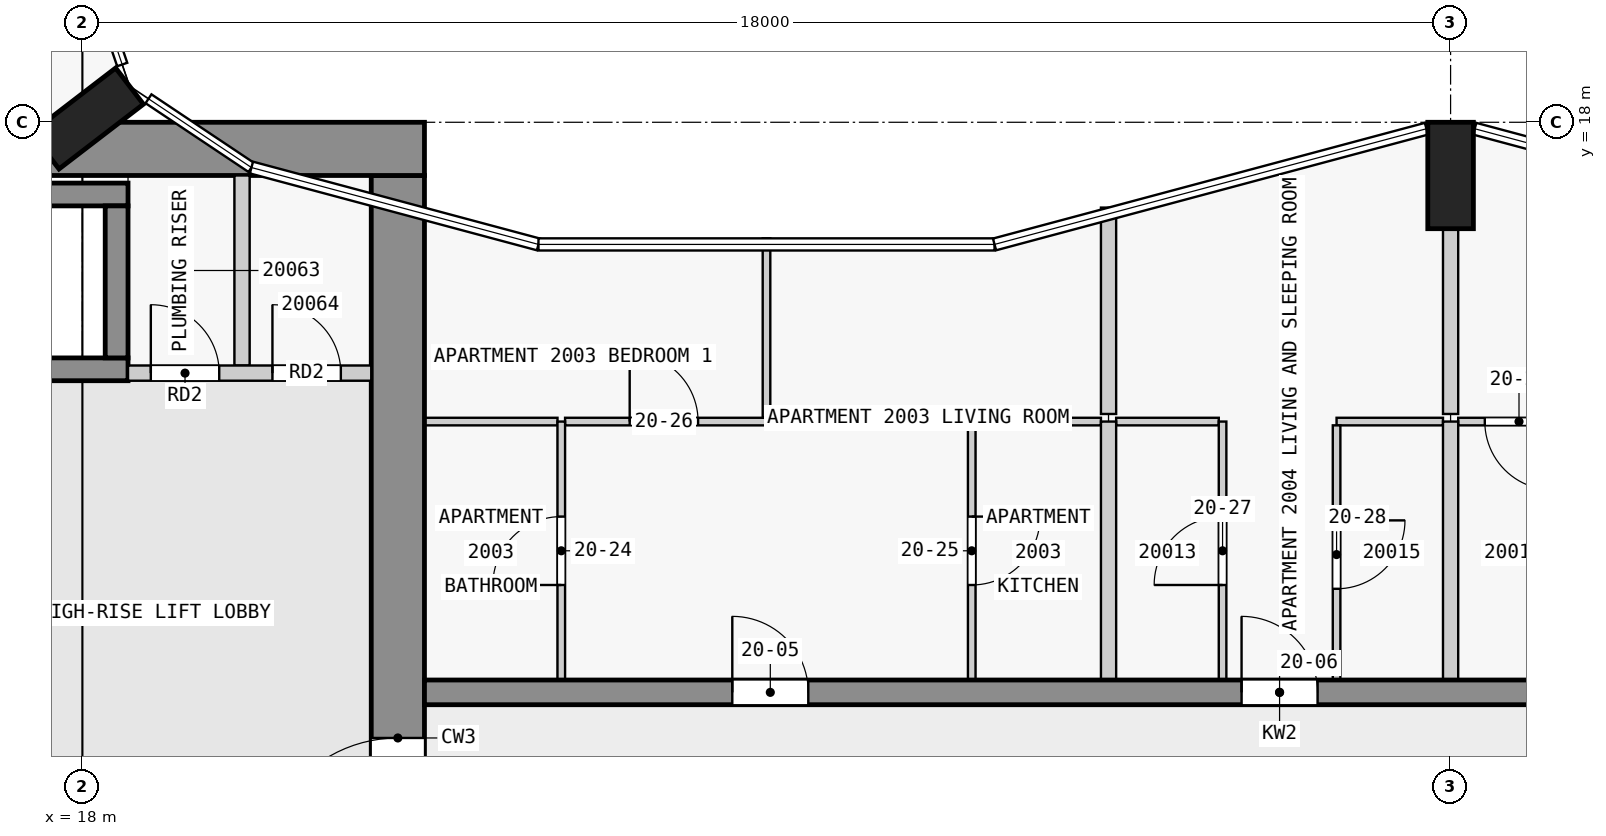
"""IFC4 building model, lengths in metres.
Left out: names, types, materials, properties, quantities, classifications, styles, units other than length and angle.
Written with IfcOpenShell. Run it as: python <this file> out.ifc"""

import sys

from ifc_helpers import new_model, si_unit, direction, frame, frame_2d, origin, origin_2d, place, context, subcontext, project, spatial, rectangle, extrude, element, fill, save


model = new_model("IFC4")
c1 = context("Model", 3, precision=1e-05, world=origin(), true_north=direction((0.0, 1.0)))
c2 = subcontext(c1, "Body", "Model", "MODEL_VIEW")
j1 = project(units=[si_unit("LENGTHUNIT", "METRE"), si_unit("PLANEANGLEUNIT", "RADIAN")], contexts=[c1])
p1 = place(None, origin())
s1 = spatial("IfcSite", under=j1, at=p1, CompositionType="ELEMENT")
p2 = place(p1, origin())
s2 = spatial("IfcBuilding", under=s1, at=p2, CompositionType="ELEMENT")
p3 = place(p2, frame((0.0, 0.0, 81.8)))
s3 = spatial("IfcBuildingStorey", under=s2, at=p3, CompositionType="ELEMENT", Elevation=81.8)
for number, where, z_axis, x_axis in (
    (1, (36.0, 17.3, 0.0), (0.0, 0.0, 1.0), (1.0, 0.0, 0.0)),
    (2, (18.065, 18.05, 0.0), (0.0, 0.0, 1.0), (-0.609, 0.793, 0.0)),
):
    element("IfcColumn", number, at=place(p3, frame(where, z_axis=z_axis, x_axis=x_axis)), inside=s3, PredefinedType="COLUMN", context=c2, shape_type="SweptSolid", body=[
        extrude(rectangle(XDim=0.6, YDim=1.4, at=origin_2d()), origin(), (0.0, 0.0, 1.0), 3.5),
    ])
p4 = place(p3, frame((1.6, 17.65, 0.0), z_axis=(0.0, 0.0, 1.0), x_axis=(1.0, 0.0, 0.0)))
e3 = element("IfcWall", 3, at=p4, inside=s3, PredefinedType="SHEAR", context=c2, shape_type="SweptSolid", body=[
    extrude(rectangle(XDim=20.9, YDim=0.7, at=frame_2d((10.45, 0.0))), origin(), (0.0, 0.0, 1.0), 3.25),
])
p5 = place(p4, frame((6.5, 0.0, 0.0)))
e4 = element("IfcOpeningElement", 4, at=p5, cuts=e3, PredefinedType="OPENING", context=c2, shape_type="SweptSolid", body=[
    extrude(rectangle(XDim=1.8, YDim=2.1, at=frame_2d((0.9, 1.05))), frame((0.0, 0.36, 0.0), z_axis=(0.0, -1.0, 0.0), x_axis=(1.0, 0.0, 0.0)), (0.0, 0.0, 1.0), 0.72),
])
p6 = place(p3, frame((22.15, 2.5, 0.0), z_axis=(0.0, 0.0, 1.0), x_axis=(0.0, 1.0, 0.0)))
e5 = element("IfcWall", 5, at=p6, inside=s3, PredefinedType="SHEAR", context=c2, shape_type="SweptSolid", body=[
    extrude(rectangle(XDim=14.8, YDim=0.7, at=frame_2d((7.4, 0.0))), origin(), (0.0, 0.0, 1.0), 3.25),
])
p7 = place(p6, frame((5.6, 0.0, 0.0)))
e6 = element("IfcOpeningElement", 6, at=p7, cuts=e5, PredefinedType="OPENING", context=c2, shape_type="SweptSolid", body=[
    extrude(rectangle(XDim=1.8, YDim=2.1, at=frame_2d((0.9, 1.05))), frame((0.0, 0.36, 0.0), z_axis=(0.0, -1.0, 0.0), x_axis=(1.0, 0.0, 0.0)), (0.0, 0.0, 1.0), 0.72),
])
for number, where, z_axis, x_axis in (
    (7, (10.8, 17.05, 0.0), (0.0, 0.0, 1.0), (1.0, 0.0, 0.0)),
    (8, (10.8, 14.75, 0.0), (0.0, 0.0, 1.0), (1.0, 0.0, 0.0)),
):
    element("IfcWall", number, at=place(p3, frame(where, z_axis=z_axis, x_axis=x_axis)), inside=s3, PredefinedType="SHEAR", context=c2, shape_type="SweptSolid", body=[
        extrude(rectangle(XDim=7.8, YDim=0.3, at=frame_2d((3.9, 0.0))), origin(), (0.0, 0.0, 1.0), 3.25),
    ])
p8 = place(p3, frame((18.45, 14.9, 0.0), z_axis=(0.0, 0.0, 1.0), x_axis=(0.0, 1.0, 0.0)))
e9 = element("IfcWall", 9, at=p8, inside=s3, PredefinedType="SHEAR", context=c2, shape_type="SweptSolid", body=[
    extrude(rectangle(XDim=2.0, YDim=0.3, at=frame_2d((1.0, 0.0))), origin(), (0.0, 0.0, 1.0), 3.25),
])
p9 = place(p3, frame((22.5, 10.5, 0.0), z_axis=(0.0, 0.0, 1.0), x_axis=(1.0, 0.0, 0.0)))
e10 = element("IfcWall", 10, at=p9, inside=s3, PredefinedType="SHEAR", context=c2, shape_type="SweptSolid", body=[
    extrude(rectangle(XDim=22.5, YDim=0.325, at=frame_2d((11.25, 0.0))), origin(), (0.0, 0.0, 1.0), 3.25),
])
p10 = place(p9, frame((4.05, 0.0, 0.0)))
e11 = element("IfcOpeningElement", 11, at=p10, cuts=e10, PredefinedType="OPENING", context=c2, shape_type="SweptSolid", body=[
    extrude(rectangle(XDim=1.0, YDim=2.1, at=frame_2d((0.5, 1.05))), frame((0.0, 0.172, 0.0), z_axis=(0.0, -1.0, 0.0), x_axis=(1.0, 0.0, 0.0)), (0.0, 0.0, 1.0), 0.345),
])
p11 = place(p9, frame((10.75, 0.0, 0.0)))
e12 = element("IfcOpeningElement", 12, at=p11, cuts=e10, PredefinedType="OPENING", context=c2, shape_type="SweptSolid", body=[
    extrude(rectangle(XDim=1.0, YDim=2.1, at=frame_2d((0.5, 1.05))), frame((0.0, 0.172, 0.0), z_axis=(0.0, -1.0, 0.0), x_axis=(1.0, 0.0, 0.0)), (0.0, 0.0, 1.0), 0.345),
])
p12 = place(p9, frame((16.85, 0.0, 0.0)))
e13 = element("IfcOpeningElement", 13, at=p12, cuts=e10, PredefinedType="OPENING", context=c2, shape_type="SweptSolid", body=[
    extrude(rectangle(XDim=1.0, YDim=2.1, at=frame_2d((0.5, 1.05))), frame((0.0, 0.172, 0.0), z_axis=(0.0, -1.0, 0.0), x_axis=(1.0, 0.0, 0.0)), (0.0, 0.0, 1.0), 0.345),
])
p13 = place(p3, frame((18.6, 14.7, 0.0), z_axis=(0.0, 0.0, 1.0), x_axis=(1.0, 0.0, 0.0)))
e14 = element("IfcWall", 14, at=p13, inside=s3, PredefinedType="PARTITIONING", context=c2, shape_type="SweptSolid", body=[
    extrude(rectangle(XDim=3.2, YDim=0.2, at=frame_2d((1.6, 0.0))), origin(), (0.0, 0.0, 1.0), 3.25),
])
p14 = place(p13, frame((0.3, 0.0, 0.0)))
e15 = element("IfcOpeningElement", 15, at=p14, cuts=e14, PredefinedType="OPENING", context=c2, shape_type="SweptSolid", body=[
    extrude(rectangle(XDim=0.9, YDim=2.1, at=frame_2d((0.45, 1.05))), frame((0.0, 0.11, 0.0), z_axis=(0.0, -1.0, 0.0), x_axis=(1.0, 0.0, 0.0)), (0.0, 0.0, 1.0), 0.22),
])
p15 = place(p13, frame((1.9, 0.0, 0.0)))
e16 = element("IfcOpeningElement", 16, at=p15, cuts=e14, PredefinedType="OPENING", context=c2, shape_type="SweptSolid", body=[
    extrude(rectangle(XDim=0.9, YDim=2.1, at=frame_2d((0.45, 1.05))), frame((0.0, 0.11, 0.0), z_axis=(0.0, -1.0, 0.0), x_axis=(1.0, 0.0, 0.0)), (0.0, 0.0, 1.0), 0.22),
])
p16 = place(p3, frame((20.1, 14.8, 0.0), z_axis=(0.0, 0.0, 1.0), x_axis=(0.0, 1.0, 0.0)))
e17 = element("IfcWall", 17, at=p16, inside=s3, PredefinedType="PARTITIONING", context=c2, shape_type="SweptSolid", body=[
    extrude(rectangle(XDim=2.5, YDim=0.2, at=frame_2d((1.25, 0.0))), origin(), (0.0, 0.0, 1.0), 3.25),
])
p17 = place(p3, frame((24.25, 14.062, 0.0), z_axis=(0.0, 0.0, 1.0), x_axis=(-1.0, 0.0, 0.0)))
e18 = element("IfcWall", 18, at=p17, inside=s3, PredefinedType="PARTITIONING", context=c2, shape_type="SweptSolid", body=[
    extrude(rectangle(XDim=1.75, YDim=0.1, at=frame_2d((0.875, 0.0))), origin(), (0.0, 0.0, 1.0), 3.25),
])
p18 = place(p3, frame((31.4, 14.062, 0.0), z_axis=(0.0, 0.0, 1.0), x_axis=(-1.0, 0.0, 0.0)))
e19 = element("IfcWall", 19, at=p18, inside=s3, PredefinedType="PARTITIONING", context=c2, shape_type="SweptSolid", body=[
    extrude(rectangle(XDim=1.65, YDim=0.1, at=frame_2d((0.825, 0.0))), origin(), (0.0, 0.0, 1.0), 3.25),
])
p19 = place(p3, frame((32.95, 14.062, 0.0), z_axis=(0.0, 0.0, 1.0), x_axis=(-1.0, 0.0, 0.0)))
e20 = element("IfcWall", 20, at=p19, inside=s3, PredefinedType="PARTITIONING", context=c2, shape_type="SweptSolid", body=[
    extrude(rectangle(XDim=1.35, YDim=0.1, at=frame_2d((0.675, 0.0))), origin(), (0.0, 0.0, 1.0), 3.25),
])
p20 = place(p3, frame((35.9, 14.062, 0.0), z_axis=(0.0, 0.0, 1.0), x_axis=(-1.0, 0.0, 0.0)))
e21 = element("IfcWall", 21, at=p20, inside=s3, PredefinedType="PARTITIONING", context=c2, shape_type="SweptSolid", body=[
    extrude(rectangle(XDim=1.4, YDim=0.1, at=frame_2d((0.7, 0.0))), origin(), (0.0, 0.0, 1.0), 3.25),
])
p21 = place(p3, frame((39.1, 14.062, 0.0), z_axis=(0.0, 0.0, 1.0), x_axis=(-1.0, 0.0, 0.0)))
e22 = element("IfcWall", 22, at=p21, inside=s3, PredefinedType="PARTITIONING", context=c2, shape_type="SweptSolid", body=[
    extrude(rectangle(XDim=3.0, YDim=0.1, at=frame_2d((1.5, 0.0))), origin(), (0.0, 0.0, 1.0), 3.25),
])
p22 = place(p21, frame((1.75, 0.0, 0.0)))
e23 = element("IfcOpeningElement", 23, at=p22, cuts=e22, PredefinedType="OPENING", context=c2, shape_type="SweptSolid", body=[
    extrude(rectangle(XDim=0.9, YDim=2.1, at=frame_2d((0.45, 1.05))), frame((0.0, 0.06, 0.0), z_axis=(0.0, -1.0, 0.0), x_axis=(1.0, 0.0, 0.0)), (0.0, 0.0, 1.0), 0.12),
])
p23 = place(p3, frame((24.35, 14.062, 0.0), z_axis=(0.0, 0.0, 1.0), x_axis=(1.0, 0.0, 0.0)))
e24 = element("IfcWall", 24, at=p23, inside=s3, PredefinedType="PARTITIONING", context=c2, shape_type="SweptSolid", body=[
    extrude(rectangle(XDim=2.65, YDim=0.1, at=frame_2d((1.325, 0.0))), origin(), (0.0, 0.0, 1.0), 3.25),
])
p24 = place(p23, frame((0.85, 0.0, 0.0)))
e25 = element("IfcOpeningElement", 25, at=p24, cuts=e24, PredefinedType="OPENING", context=c2, shape_type="SweptSolid", body=[
    extrude(rectangle(XDim=0.9, YDim=2.1, at=frame_2d((0.45, 1.05))), frame((0.0, 0.06, 0.0), z_axis=(0.0, -1.0, 0.0), x_axis=(1.0, 0.0, 0.0)), (0.0, 0.0, 1.0), 0.12),
])
p25 = place(p3, frame((24.3, 10.663, 0.0), z_axis=(0.0, 0.0, 1.0), x_axis=(0.0, 1.0, 0.0)))
e26 = element("IfcWall", 26, at=p25, inside=s3, PredefinedType="PARTITIONING", context=c2, shape_type="SweptSolid", body=[
    extrude(rectangle(XDim=3.4, YDim=0.1, at=frame_2d((1.7, 0.0))), origin(), (0.0, 0.0, 1.0), 3.25),
])
p26 = place(p25, frame((1.25, 0.0, 0.0)))
e27 = element("IfcOpeningElement", 27, at=p26, cuts=e26, PredefinedType="OPENING", context=c2, shape_type="SweptSolid", body=[
    extrude(rectangle(XDim=0.9, YDim=2.1, at=frame_2d((0.45, 1.05))), frame((0.0, 0.06, 0.0), z_axis=(0.0, -1.0, 0.0), x_axis=(1.0, 0.0, 0.0)), (0.0, 0.0, 1.0), 0.12),
])
p27 = place(p3, frame((27.0, 14.113, 0.0), z_axis=(0.0, 0.0, 1.0), x_axis=(0.0, 1.0, 0.0)))
e28 = element("IfcWall", 28, at=p27, inside=s3, PredefinedType="PARTITIONING", context=c2, shape_type="SweptSolid", body=[
    extrude(rectangle(XDim=2.361, YDim=0.1, at=frame_2d((1.18, 0.0))), origin(), (0.0, 0.0, 1.0), 3.25),
])
p28 = place(p3, frame((29.7, 14.062, 0.0), z_axis=(0.0, 0.0, 1.0), x_axis=(0.0, -1.0, 0.0)))
e29 = element("IfcWall", 29, at=p28, inside=s3, PredefinedType="PARTITIONING", context=c2, shape_type="SweptSolid", body=[
    extrude(rectangle(XDim=3.4, YDim=0.1, at=frame_2d((1.7, 0.0))), origin(), (0.0, 0.0, 1.0), 3.25),
])
p29 = place(p28, frame((1.25, 0.0, 0.0)))
e30 = element("IfcOpeningElement", 30, at=p29, cuts=e29, PredefinedType="OPENING", context=c2, shape_type="SweptSolid", body=[
    extrude(rectangle(XDim=0.9, YDim=2.1, at=frame_2d((0.45, 1.05))), frame((0.0, 0.06, 0.0), z_axis=(0.0, -1.0, 0.0), x_axis=(1.0, 0.0, 0.0)), (0.0, 0.0, 1.0), 0.12),
])
p30 = place(p3, frame((31.5, 16.878, 0.0), z_axis=(0.0, 0.0, 1.0), x_axis=(0.0, -1.0, 0.0)))
e31 = element("IfcWall", 31, at=p30, inside=s3, PredefinedType="PARTITIONING", context=c2, shape_type="SweptSolid", body=[
    extrude(rectangle(XDim=2.715, YDim=0.2, at=frame_2d((1.357, 0.0))), origin(), (0.0, 0.0, 1.0), 3.25),
])
p31 = place(p3, frame((31.5, 10.663, 0.0), z_axis=(0.0, 0.0, 1.0), x_axis=(0.0, 1.0, 0.0)))
e32 = element("IfcWall", 32, at=p31, inside=s3, PredefinedType="PARTITIONING", context=c2, shape_type="SweptSolid", body=[
    extrude(rectangle(XDim=3.4, YDim=0.2, at=frame_2d((1.7, 0.0))), origin(), (0.0, 0.0, 1.0), 3.25),
])
p32 = place(p3, frame((33.0, 10.663, 0.0), z_axis=(0.0, 0.0, 1.0), x_axis=(0.0, 1.0, 0.0)))
e33 = element("IfcWall", 33, at=p32, inside=s3, PredefinedType="PARTITIONING", context=c2, shape_type="SweptSolid", body=[
    extrude(rectangle(XDim=3.4, YDim=0.1, at=frame_2d((1.7, 0.0))), origin(), (0.0, 0.0, 1.0), 3.25),
])
p33 = place(p32, frame((1.25, 0.0, 0.0)))
e34 = element("IfcOpeningElement", 34, at=p33, cuts=e33, PredefinedType="OPENING", context=c2, shape_type="SweptSolid", body=[
    extrude(rectangle(XDim=0.9, YDim=2.1, at=frame_2d((0.45, 1.05))), frame((0.0, 0.06, 0.0), z_axis=(0.0, -1.0, 0.0), x_axis=(1.0, 0.0, 0.0)), (0.0, 0.0, 1.0), 0.12),
])
p34 = place(p3, frame((34.5, 14.012, 0.0), z_axis=(0.0, 0.0, 1.0), x_axis=(0.0, -1.0, 0.0)))
e35 = element("IfcWall", 35, at=p34, inside=s3, PredefinedType="PARTITIONING", context=c2, shape_type="SweptSolid", body=[
    extrude(rectangle(XDim=3.35, YDim=0.1, at=frame_2d((1.675, 0.0))), origin(), (0.0, 0.0, 1.0), 3.25),
])
p35 = place(p34, frame((1.25, 0.0, 0.0)))
e36 = element("IfcOpeningElement", 36, at=p35, cuts=e35, PredefinedType="OPENING", context=c2, shape_type="SweptSolid", body=[
    extrude(rectangle(XDim=0.9, YDim=2.1, at=frame_2d((0.45, 1.05))), frame((0.0, 0.06, 0.0), z_axis=(0.0, -1.0, 0.0), x_axis=(1.0, 0.0, 0.0)), (0.0, 0.0, 1.0), 0.12),
])
p36 = place(p3, frame((36.0, 16.6, 0.0), z_axis=(0.0, 0.0, 1.0), x_axis=(0.0, -1.0, 0.0)))
e37 = element("IfcWall", 37, at=p36, inside=s3, PredefinedType="PARTITIONING", context=c2, shape_type="SweptSolid", body=[
    extrude(rectangle(XDim=2.438, YDim=0.2, at=frame_2d((1.219, 0.0))), origin(), (0.0, 0.0, 1.0), 3.25),
])
p37 = place(p3, frame((36.0, 10.663, 0.0), z_axis=(0.0, 0.0, 1.0), x_axis=(0.0, 1.0, 0.0)))
e38 = element("IfcWall", 38, at=p37, inside=s3, PredefinedType="PARTITIONING", context=c2, shape_type="SweptSolid", body=[
    extrude(rectangle(XDim=3.4, YDim=0.2, at=frame_2d((1.7, 0.0))), origin(), (0.0, 0.0, 1.0), 3.25),
])
p38 = place(p7, origin())
e39 = element("IfcDoor", 39, at=p38, inside=s3, OperationType="DOUBLE_DOOR_SINGLE_SWING", PredefinedType="DOOR", context=c2, shape_type="SweptSolid", body=[
    extrude(rectangle(XDim=1.8, YDim=2.1, at=frame_2d((0.9, 1.05))), frame((0.0, 0.025, 0.0), z_axis=(0.0, -1.0, 0.0), x_axis=(1.0, 0.0, 0.0)), (0.0, 0.0, 1.0), 0.05),
])
fill(e6, e39)
p39 = place(p14, origin())
e40 = element("IfcDoor", 40, at=p39, inside=s3, OperationType="SINGLE_SWING_LEFT", PredefinedType="DOOR", context=c2, shape_type="SweptSolid", body=[
    extrude(rectangle(XDim=0.9, YDim=2.1, at=frame_2d((0.45, 1.05))), frame((0.0, 0.025, 0.0), z_axis=(0.0, -1.0, 0.0), x_axis=(1.0, 0.0, 0.0)), (0.0, 0.0, 1.0), 0.05),
])
fill(e15, e40)
p40 = place(p15, origin())
e41 = element("IfcDoor", 41, at=p40, inside=s3, OperationType="SINGLE_SWING_LEFT", PredefinedType="DOOR", context=c2, shape_type="SweptSolid", body=[
    extrude(rectangle(XDim=0.9, YDim=2.1, at=frame_2d((0.45, 1.05))), frame((0.0, 0.025, 0.0), z_axis=(0.0, -1.0, 0.0), x_axis=(1.0, 0.0, 0.0)), (0.0, 0.0, 1.0), 0.05),
])
fill(e16, e41)
p41 = place(p10, origin())
e42 = element("IfcDoor", 42, at=p41, inside=s3, OperationType="SINGLE_SWING_LEFT", PredefinedType="DOOR", context=c2, shape_type="SweptSolid", body=[
    extrude(rectangle(XDim=1.0, YDim=2.1, at=frame_2d((0.5, 1.05))), frame((0.0, 0.025, 0.0), z_axis=(0.0, -1.0, 0.0), x_axis=(1.0, 0.0, 0.0)), (0.0, 0.0, 1.0), 0.05),
])
fill(e11, e42)
p42 = place(p11, origin())
e43 = element("IfcDoor", 43, at=p42, inside=s3, OperationType="SINGLE_SWING_LEFT", PredefinedType="DOOR", context=c2, shape_type="SweptSolid", body=[
    extrude(rectangle(XDim=1.0, YDim=2.1, at=frame_2d((0.5, 1.05))), frame((0.0, 0.025, 0.0), z_axis=(0.0, -1.0, 0.0), x_axis=(1.0, 0.0, 0.0)), (0.0, 0.0, 1.0), 0.05),
])
fill(e12, e43)
p43 = place(p26, origin())
e44 = element("IfcDoor", 44, at=p43, inside=s3, OperationType="SINGLE_SWING_LEFT", PredefinedType="DOOR", context=c2, shape_type="SweptSolid", body=[
    extrude(rectangle(XDim=0.9, YDim=2.1, at=frame_2d((0.45, 1.05))), frame((0.0, 0.025, 0.0), z_axis=(0.0, -1.0, 0.0), x_axis=(1.0, 0.0, 0.0)), (0.0, 0.0, 1.0), 0.05),
])
fill(e27, e44)
p44 = place(p29, origin())
e45 = element("IfcDoor", 45, at=p44, inside=s3, OperationType="SINGLE_SWING_LEFT", PredefinedType="DOOR", context=c2, shape_type="SweptSolid", body=[
    extrude(rectangle(XDim=0.9, YDim=2.1, at=frame_2d((0.45, 1.05))), frame((0.0, 0.025, 0.0), z_axis=(0.0, -1.0, 0.0), x_axis=(1.0, 0.0, 0.0)), (0.0, 0.0, 1.0), 0.05),
])
fill(e30, e45)
p45 = place(p24, origin())
e46 = element("IfcDoor", 46, at=p45, inside=s3, OperationType="SINGLE_SWING_LEFT", PredefinedType="DOOR", context=c2, shape_type="SweptSolid", body=[
    extrude(rectangle(XDim=0.9, YDim=2.1, at=frame_2d((0.45, 1.05))), frame((0.0, 0.025, 0.0), z_axis=(0.0, -1.0, 0.0), x_axis=(1.0, 0.0, 0.0)), (0.0, 0.0, 1.0), 0.05),
])
fill(e25, e46)
p46 = place(p33, origin())
e47 = element("IfcDoor", 47, at=p46, inside=s3, OperationType="SINGLE_SWING_LEFT", PredefinedType="DOOR", context=c2, shape_type="SweptSolid", body=[
    extrude(rectangle(XDim=0.9, YDim=2.1, at=frame_2d((0.45, 1.05))), frame((0.0, 0.025, 0.0), z_axis=(0.0, -1.0, 0.0), x_axis=(1.0, 0.0, 0.0)), (0.0, 0.0, 1.0), 0.05),
])
fill(e34, e47)
p47 = place(p35, origin())
e48 = element("IfcDoor", 48, at=p47, inside=s3, OperationType="SINGLE_SWING_RIGHT", PredefinedType="DOOR", context=c2, shape_type="SweptSolid", body=[
    extrude(rectangle(XDim=0.9, YDim=2.1, at=frame_2d((0.45, 1.05))), frame((0.0, 0.025, 0.0), z_axis=(0.0, -1.0, 0.0), x_axis=(1.0, 0.0, 0.0)), (0.0, 0.0, 1.0), 0.05),
])
fill(e36, e48)
p48 = place(p22, origin())
e49 = element("IfcDoor", 49, at=p48, inside=s3, OperationType="SINGLE_SWING_RIGHT", PredefinedType="DOOR", context=c2, shape_type="SweptSolid", body=[
    extrude(rectangle(XDim=0.9, YDim=2.1, at=frame_2d((0.45, 1.05))), frame((0.0, 0.025, 0.0), z_axis=(0.0, -1.0, 0.0), x_axis=(1.0, 0.0, 0.0)), (0.0, 0.0, 1.0), 0.05),
])
fill(e23, e49)
save(model, sys.argv[1])
